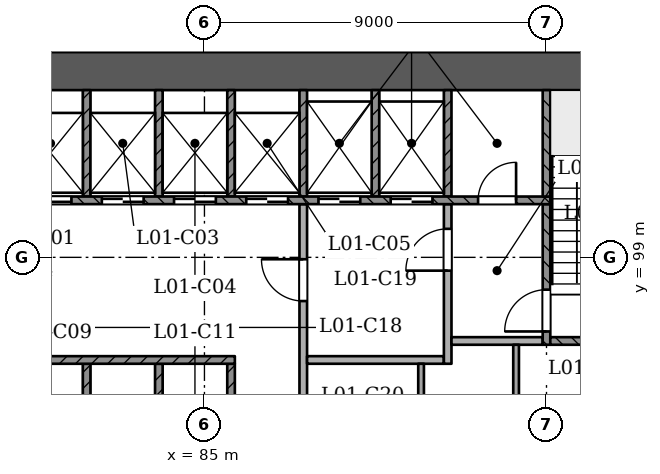
"""IFC4 building model, lengths in metres.
Left out: names, types, materials, properties, quantities, classifications, styles, units other than length and angle.
Written with IfcOpenShell. Run it as: python <this file> out.ifc"""

import sys

from ifc_helpers import new_model, si_unit, direction, frame, frame_2d, origin, place, context, subcontext, project, spatial, rectangle, extrude, element, fill, save


model = new_model("IFC4")
c1 = context("Model", 3, precision=1e-05, world=origin(), true_north=direction((0.0, 1.0)))
c2 = subcontext(c1, "Body", "Model", "MODEL_VIEW")
j1 = project(units=[si_unit("LENGTHUNIT", "METRE"), si_unit("PLANEANGLEUNIT", "RADIAN")], contexts=[c1])
p1 = place(None, origin())
s1 = spatial("IfcSite", under=j1, at=p1, CompositionType="ELEMENT")
p2 = place(p1, origin())
s2 = spatial("IfcBuilding", under=s1, at=p2, CompositionType="ELEMENT")
p3 = place(p2, frame((0.0, 0.0, 9.0)))
s3 = spatial("IfcBuildingStorey", under=s2, at=p3, CompositionType="ELEMENT", Elevation=9.0)
p4 = place(p3, frame((97.5, 103.9, 0.0), z_axis=(0.0, 0.0, 1.0), x_axis=(-1.0, 0.0, 0.0)))
e1 = element("IfcWall", 1, at=p4, inside=s3, PredefinedType="SHEAR", context=c2, shape_type="SweptSolid", body=[
    extrude(rectangle(XDim=25.5, YDim=1.0, at=frame_2d((12.75, 0.0))), origin(), (0.0, 0.0, 1.0), 4.5),
])
p5 = place(p3, frame((55.57, 95.474, 0.0), z_axis=(0.0, 0.0, 1.0), x_axis=(0.500000085768, -0.866025354266, 0.0)))
e2 = element("IfcWall", 2, at=p5, inside=s3, PredefinedType="PARTITIONING", context=c2, shape_type="SweptSolid", body=[
    extrude(rectangle(XDim=55.365, YDim=0.15, at=frame_2d((27.682, 0.0))), origin(), (0.0, 0.0, 1.0), 4.05),
])
p6 = place(p5, frame((6.832, 0.0, 0.0)))
e3 = element("IfcOpeningElement", 3, at=p6, cuts=e2, PredefinedType="OPENING", context=c2, shape_type="SweptSolid", body=[
    extrude(rectangle(XDim=1.2, YDim=2.1, at=frame_2d((0.6, 1.05))), frame((0.0, 0.085, 0.0), z_axis=(0.0, -1.0, 0.0), x_axis=(1.0, 0.0, 0.0)), (0.0, 0.0, 1.0), 0.171),
])
p7 = place(p5, frame((18.182, 0.0, 0.0)))
e4 = element("IfcOpeningElement", 4, at=p7, cuts=e2, PredefinedType="OPENING", context=c2, shape_type="SweptSolid", body=[
    extrude(rectangle(XDim=1.0, YDim=2.1, at=frame_2d((0.5, 1.05))), frame((0.0, 0.085, 0.0), z_axis=(0.0, -1.0, 0.0), x_axis=(1.0, 0.0, 0.0)), (0.0, 0.0, 1.0), 0.171),
])
p8 = place(p5, frame((30.132, 0.0, 0.0)))
e5 = element("IfcOpeningElement", 5, at=p8, cuts=e2, PredefinedType="OPENING", context=c2, shape_type="SweptSolid", body=[
    extrude(rectangle(XDim=1.2, YDim=2.1, at=frame_2d((0.6, 1.05))), frame((0.0, 0.085, 0.0), z_axis=(0.0, -1.0, 0.0), x_axis=(1.0, 0.0, 0.0)), (0.0, 0.0, 1.0), 0.171),
])
p9 = place(p5, frame((40.582, 0.0, 0.0)))
e6 = element("IfcOpeningElement", 6, at=p9, cuts=e2, PredefinedType="OPENING", context=c2, shape_type="SweptSolid", body=[
    extrude(rectangle(XDim=1.2, YDim=2.1, at=frame_2d((0.6, 1.05))), frame((0.0, 0.085, 0.0), z_axis=(0.0, -1.0, 0.0), x_axis=(1.0, 0.0, 0.0)), (0.0, 0.0, 1.0), 0.171),
])
p10 = place(p5, frame((46.315, 0.0, 0.0)))
e7 = element("IfcOpeningElement", 7, at=p10, cuts=e2, PredefinedType="OPENING", context=c2, shape_type="SweptSolid", body=[
    extrude(rectangle(XDim=0.9, YDim=2.1, at=frame_2d((0.45, 1.05))), frame((0.0, 0.085, 0.0), z_axis=(0.0, -1.0, 0.0), x_axis=(1.0, 0.0, 0.0)), (0.0, 0.0, 1.0), 0.171),
])
p11 = place(p5, frame((48.565, 0.0, 0.0)))
e8 = element("IfcOpeningElement", 8, at=p11, cuts=e2, PredefinedType="OPENING", context=c2, shape_type="SweptSolid", body=[
    extrude(rectangle(XDim=0.9, YDim=2.1, at=frame_2d((0.45, 1.05))), frame((0.0, 0.085, 0.0), z_axis=(0.0, -1.0, 0.0), x_axis=(1.0, 0.0, 0.0)), (0.0, 0.0, 1.0), 0.171),
])
p12 = place(p5, frame((53.195, 0.0, 0.0)))
e9 = element("IfcOpeningElement", 9, at=p12, cuts=e2, PredefinedType="OPENING", context=c2, shape_type="SweptSolid", body=[
    extrude(rectangle(XDim=1.2, YDim=2.1, at=frame_2d((0.6, 1.05))), frame((0.0, 0.085, 0.0), z_axis=(0.0, -1.0, 0.0), x_axis=(1.0, 0.0, 0.0)), (0.0, 0.0, 1.0), 0.171),
])
p13 = place(p3, frame((86.747, 47.526, 0.0), z_axis=(0.0, 0.0, 1.0), x_axis=(0.500000085768, 0.866025354266, 0.0)))
e10 = element("IfcWall", 10, at=p13, inside=s3, PredefinedType="PARTITIONING", context=c2, shape_type="SweptSolid", body=[
    extrude(rectangle(XDim=55.365, YDim=0.15, at=frame_2d((27.682, 0.0))), origin(), (0.0, 0.0, 1.0), 4.05),
])
p14 = place(p13, frame((0.97, 0.0, 0.0)))
e11 = element("IfcOpeningElement", 11, at=p14, cuts=e10, PredefinedType="OPENING", context=c2, shape_type="SweptSolid", body=[
    extrude(rectangle(XDim=1.2, YDim=2.1, at=frame_2d((0.6, 1.05))), frame((0.0, 0.085, 0.0), z_axis=(0.0, -1.0, 0.0), x_axis=(1.0, 0.0, 0.0)), (0.0, 0.0, 1.0), 0.171),
])
p15 = place(p13, frame((9.082, 0.0, 0.0)))
e12 = element("IfcOpeningElement", 12, at=p15, cuts=e10, PredefinedType="OPENING", context=c2, shape_type="SweptSolid", body=[
    extrude(rectangle(XDim=1.2, YDim=2.1, at=frame_2d((0.6, 1.05))), frame((0.0, 0.085, 0.0), z_axis=(0.0, -1.0, 0.0), x_axis=(1.0, 0.0, 0.0)), (0.0, 0.0, 1.0), 0.171),
])
p16 = place(p13, frame((18.082, 0.0, 0.0)))
e13 = element("IfcOpeningElement", 13, at=p16, cuts=e10, PredefinedType="OPENING", context=c2, shape_type="SweptSolid", body=[
    extrude(rectangle(XDim=1.2, YDim=2.1, at=frame_2d((0.6, 1.05))), frame((0.0, 0.085, 0.0), z_axis=(0.0, -1.0, 0.0), x_axis=(1.0, 0.0, 0.0)), (0.0, 0.0, 1.0), 0.171),
])
p17 = place(p13, frame((23.613, 0.0, 0.0)))
e14 = element("IfcOpeningElement", 14, at=p17, cuts=e10, PredefinedType="OPENING", context=c2, shape_type="SweptSolid", body=[
    extrude(rectangle(XDim=1.0, YDim=2.1, at=frame_2d((0.5, 1.05))), frame((0.0, 0.085, 0.0), z_axis=(0.0, -1.0, 0.0), x_axis=(1.0, 0.0, 0.0)), (0.0, 0.0, 1.0), 0.171),
])
p18 = place(p13, frame((26.363, 0.0, 0.0)))
e15 = element("IfcOpeningElement", 15, at=p18, cuts=e10, PredefinedType="OPENING", context=c2, shape_type="SweptSolid", body=[
    extrude(rectangle(XDim=1.0, YDim=2.1, at=frame_2d((0.5, 1.05))), frame((0.0, 0.085, 0.0), z_axis=(0.0, -1.0, 0.0), x_axis=(1.0, 0.0, 0.0)), (0.0, 0.0, 1.0), 0.171),
])
p19 = place(p13, frame((33.032, 0.0, 0.0)))
e16 = element("IfcOpeningElement", 16, at=p19, cuts=e10, PredefinedType="OPENING", context=c2, shape_type="SweptSolid", body=[
    extrude(rectangle(XDim=1.2, YDim=2.1, at=frame_2d((0.6, 1.05))), frame((0.0, 0.085, 0.0), z_axis=(0.0, -1.0, 0.0), x_axis=(1.0, 0.0, 0.0)), (0.0, 0.0, 1.0), 0.171),
])
p20 = place(p13, frame((47.337, 0.0, 0.0)))
e17 = element("IfcOpeningElement", 17, at=p20, cuts=e10, PredefinedType="OPENING", context=c2, shape_type="SweptSolid", body=[
    extrude(rectangle(XDim=1.2, YDim=2.1, at=frame_2d((0.6, 1.05))), frame((0.0, 0.085, 0.0), z_axis=(0.0, -1.0, 0.0), x_axis=(1.0, 0.0, 0.0)), (0.0, 0.0, 1.0), 0.171),
])
p21 = place(p3, frame((121.762, 95.574, 0.0), z_axis=(0.0, 0.0, 1.0), x_axis=(-0.499997306052, -0.866026959131, 0.0)))
e18 = element("IfcWall", 18, at=p21, inside=s3, PredefinedType="SOLIDWALL", context=c2, shape_type="SweptSolid", body=[
    extrude(rectangle(XDim=62.87, YDim=0.4, at=frame_2d((31.435, 0.0))), origin(), (0.0, 0.0, 1.0), 4.05),
])
p22 = place(p21, frame((59.452, 0.0, 0.9)))
e19 = element("IfcOpeningElement", 19, at=p22, cuts=e18, PredefinedType="OPENING", context=c2, shape_type="SweptSolid", body=[
    extrude(rectangle(XDim=2.4, YDim=1.5, at=frame_2d((1.2, 0.75))), frame((0.0, 0.21, 0.0), z_axis=(0.0, -1.0, 0.0), x_axis=(1.0, 0.0, 0.0)), (0.0, 0.0, 1.0), 0.421),
])
p23 = place(p21, frame((54.986, 0.0, 0.9)))
e20 = element("IfcOpeningElement", 20, at=p23, cuts=e18, PredefinedType="OPENING", context=c2, shape_type="SweptSolid", body=[
    extrude(rectangle(XDim=2.4, YDim=1.5, at=frame_2d((1.2, 0.75))), frame((0.0, 0.21, 0.0), z_axis=(0.0, -1.0, 0.0), x_axis=(1.0, 0.0, 0.0)), (0.0, 0.0, 1.0), 0.421),
])
p24 = place(p21, frame((50.486, 0.0, 0.9)))
e21 = element("IfcOpeningElement", 21, at=p24, cuts=e18, PredefinedType="OPENING", context=c2, shape_type="SweptSolid", body=[
    extrude(rectangle(XDim=2.4, YDim=1.5, at=frame_2d((1.2, 0.75))), frame((0.0, 0.21, 0.0), z_axis=(0.0, -1.0, 0.0), x_axis=(1.0, 0.0, 0.0)), (0.0, 0.0, 1.0), 0.421),
])
p25 = place(p21, frame((45.986, 0.0, 0.9)))
e22 = element("IfcOpeningElement", 22, at=p25, cuts=e18, PredefinedType="OPENING", context=c2, shape_type="SweptSolid", body=[
    extrude(rectangle(XDim=2.4, YDim=1.5, at=frame_2d((1.2, 0.75))), frame((0.0, 0.21, 0.0), z_axis=(0.0, -1.0, 0.0), x_axis=(1.0, 0.0, 0.0)), (0.0, 0.0, 1.0), 0.421),
])
p26 = place(p21, frame((41.486, 0.0, 0.9)))
e23 = element("IfcOpeningElement", 23, at=p26, cuts=e18, PredefinedType="OPENING", context=c2, shape_type="SweptSolid", body=[
    extrude(rectangle(XDim=2.4, YDim=1.5, at=frame_2d((1.2, 0.75))), frame((0.0, 0.21, 0.0), z_axis=(0.0, -1.0, 0.0), x_axis=(1.0, 0.0, 0.0)), (0.0, 0.0, 1.0), 0.421),
])
p27 = place(p21, frame((36.986, 0.0, 0.9)))
e24 = element("IfcOpeningElement", 24, at=p27, cuts=e18, PredefinedType="OPENING", context=c2, shape_type="SweptSolid", body=[
    extrude(rectangle(XDim=2.4, YDim=1.5, at=frame_2d((1.2, 0.75))), frame((0.0, 0.21, 0.0), z_axis=(0.0, -1.0, 0.0), x_axis=(1.0, 0.0, 0.0)), (0.0, 0.0, 1.0), 0.421),
])
p28 = place(p21, frame((23.486, 0.0, 0.9)))
e25 = element("IfcOpeningElement", 25, at=p28, cuts=e18, PredefinedType="OPENING", context=c2, shape_type="SweptSolid", body=[
    extrude(rectangle(XDim=2.4, YDim=1.5, at=frame_2d((1.2, 0.75))), frame((0.0, 0.21, 0.0), z_axis=(0.0, -1.0, 0.0), x_axis=(1.0, 0.0, 0.0)), (0.0, 0.0, 1.0), 0.421),
])
p29 = place(p21, frame((18.986, 0.0, 0.9)))
e26 = element("IfcOpeningElement", 26, at=p29, cuts=e18, PredefinedType="OPENING", context=c2, shape_type="SweptSolid", body=[
    extrude(rectangle(XDim=2.4, YDim=1.5, at=frame_2d((1.2, 0.75))), frame((0.0, 0.21, 0.0), z_axis=(0.0, -1.0, 0.0), x_axis=(1.0, 0.0, 0.0)), (0.0, 0.0, 1.0), 0.421),
])
p30 = place(p21, frame((14.486, 0.0, 0.9)))
e27 = element("IfcOpeningElement", 27, at=p30, cuts=e18, PredefinedType="OPENING", context=c2, shape_type="SweptSolid", body=[
    extrude(rectangle(XDim=2.4, YDim=1.5, at=frame_2d((1.2, 0.75))), frame((0.0, 0.21, 0.0), z_axis=(0.0, -1.0, 0.0), x_axis=(1.0, 0.0, 0.0)), (0.0, 0.0, 1.0), 0.421),
])
p31 = place(p21, frame((5.486, 0.0, 0.9)))
e28 = element("IfcOpeningElement", 28, at=p31, cuts=e18, PredefinedType="OPENING", context=c2, shape_type="SweptSolid", body=[
    extrude(rectangle(XDim=2.4, YDim=1.5, at=frame_2d((1.2, 0.75))), frame((0.0, 0.21, 0.0), z_axis=(0.0, -1.0, 0.0), x_axis=(1.0, 0.0, 0.0)), (0.0, 0.0, 1.0), 0.421),
])
p32 = place(p21, frame((1.018, 0.0, 0.9)))
e29 = element("IfcOpeningElement", 29, at=p32, cuts=e18, PredefinedType="OPENING", context=c2, shape_type="SweptSolid", body=[
    extrude(rectangle(XDim=2.4, YDim=1.5, at=frame_2d((1.2, 0.75))), frame((0.0, 0.21, 0.0), z_axis=(0.0, -1.0, 0.0), x_axis=(1.0, 0.0, 0.0)), (0.0, 0.0, 1.0), 0.421),
])
for number, where, z_axis, x_axis in (
    (30, (81.9, 93.4, 0.0), (0.0, 0.0, 1.0), (0.0, 1.0, 0.0)),
    (31, (83.8, 93.4, 0.0), (0.0, 0.0, 1.0), (0.0, 1.0, 0.0)),
    (32, (85.7, 93.4, 0.0), (0.0, 0.0, 1.0), (0.0, 1.0, 0.0)),
):
    element("IfcWall", number, at=place(p3, frame(where, z_axis=z_axis, x_axis=x_axis)), inside=s3, PredefinedType="SOLIDWALL", context=c2, shape_type="SweptSolid", body=[
        extrude(rectangle(XDim=2.8, YDim=0.2, at=frame_2d((1.4, 0.0))), origin(), (0.0, 0.0, 1.0), 4.05),
    ])
p33 = place(p3, frame((87.6, 93.4, 0.0), z_axis=(0.0, 0.0, 1.0), x_axis=(0.0, 1.0, 0.0)))
e33 = element("IfcWall", 33, at=p33, inside=s3, PredefinedType="PARTITIONING", context=c2, shape_type="SweptSolid", body=[
    extrude(rectangle(XDim=7.0, YDim=0.2, at=frame_2d((3.5, 0.0))), origin(), (0.0, 0.0, 1.0), 4.05),
])
p34 = place(p33, frame((4.45, 0.0, 0.0)))
e34 = element("IfcOpeningElement", 34, at=p34, cuts=e33, PredefinedType="OPENING", context=c2, shape_type="SweptSolid", body=[
    extrude(rectangle(XDim=1.1, YDim=2.1, at=frame_2d((0.55, 1.05))), frame((0.0, 0.11, 0.0), z_axis=(0.0, -1.0, 0.0), x_axis=(1.0, 0.0, 0.0)), (0.0, 0.0, 1.0), 0.221),
])
p35 = place(p3, frame((90.7, 93.4, 0.0), z_axis=(0.0, 0.0, 1.0), x_axis=(0.0, 1.0, 0.0)))
e35 = element("IfcWall", 35, at=p35, inside=s3, PredefinedType="PARTITIONING", context=c2, shape_type="SweptSolid", body=[
    extrude(rectangle(XDim=2.8, YDim=0.15, at=frame_2d((1.4, 0.0))), origin(), (0.0, 0.0, 1.0), 4.05),
])
p36 = place(p3, frame((93.2, 93.4, 0.0), z_axis=(0.0, 0.0, 1.0), x_axis=(0.0, 1.0, 0.0)))
e36 = element("IfcWall", 36, at=p36, inside=s3, PredefinedType="PARTITIONING", context=c2, shape_type="SweptSolid", body=[
    extrude(rectangle(XDim=3.3, YDim=0.15, at=frame_2d((1.65, 0.0))), origin(), (0.0, 0.0, 1.0), 4.05),
])
p37 = place(p3, frame((78.0, 96.3, 0.0), z_axis=(0.0, 0.0, 1.0), x_axis=(1.0, 0.0, 0.0)))
e37 = element("IfcWall", 37, at=p37, inside=s3, PredefinedType="SOLIDWALL", context=c2, shape_type="SweptSolid", body=[
    extrude(rectangle(XDim=7.8, YDim=0.2, at=frame_2d((3.9, 0.0))), origin(), (0.0, 0.0, 1.0), 4.05),
])
p38 = place(p3, frame((87.7, 96.3, 0.0), z_axis=(0.0, 0.0, 1.0), x_axis=(1.0, 0.0, 0.0)))
e38 = element("IfcWall", 38, at=p38, inside=s3, PredefinedType="PARTITIONING", context=c2, shape_type="SweptSolid", body=[
    extrude(rectangle(XDim=3.6, YDim=0.2, at=frame_2d((1.8, 0.0))), origin(), (0.0, 0.0, 1.0), 4.05),
])
p39 = place(p3, frame((91.4, 96.2, 0.0), z_axis=(0.0, 0.0, 1.0), x_axis=(0.0, 1.0, 0.0)))
e39 = element("IfcWall", 39, at=p39, inside=s3, PredefinedType="PARTITIONING", context=c2, shape_type="SweptSolid", body=[
    extrude(rectangle(XDim=4.2, YDim=0.2, at=frame_2d((2.1, 0.0))), origin(), (0.0, 0.0, 1.0), 4.05),
])
p40 = place(p39, frame((2.45, 0.0, 0.0)))
e40 = element("IfcOpeningElement", 40, at=p40, cuts=e39, PredefinedType="OPENING", context=c2, shape_type="SweptSolid", body=[
    extrude(rectangle(XDim=1.1, YDim=2.1, at=frame_2d((0.55, 1.05))), frame((0.0, 0.11, 0.0), z_axis=(0.0, -1.0, 0.0), x_axis=(1.0, 0.0, 0.0)), (0.0, 0.0, 1.0), 0.221),
])
p41 = place(p3, frame((91.5, 96.8, 0.0), z_axis=(0.0, 0.0, 1.0), x_axis=(1.0, 0.0, 0.0)))
e41 = element("IfcWall", 41, at=p41, inside=s3, PredefinedType="PARTITIONING", context=c2, shape_type="SweptSolid", body=[
    extrude(rectangle(XDim=2.4, YDim=0.2, at=frame_2d((1.2, 0.0))), origin(), (0.0, 0.0, 1.0), 4.05),
])
p42 = place(p3, frame((94.0, 96.7, 0.0), z_axis=(0.0, 0.0, 1.0), x_axis=(0.0, 1.0, 0.0)))
e42 = element("IfcWall", 42, at=p42, inside=s3, PredefinedType="SOLIDWALL", context=c2, shape_type="SweptSolid", body=[
    extrude(rectangle(XDim=3.7, YDim=0.2, at=frame_2d((1.85, 0.0))), origin(), (0.0, 0.0, 1.0), 4.05),
])
p43 = place(p42, frame((0.35, 0.0, 0.0)))
e43 = element("IfcOpeningElement", 43, at=p43, cuts=e42, PredefinedType="OPENING", context=c2, shape_type="SweptSolid", body=[
    extrude(rectangle(XDim=1.1, YDim=2.1, at=frame_2d((0.55, 1.05))), frame((0.0, 0.11, 0.0), z_axis=(0.0, -1.0, 0.0), x_axis=(1.0, 0.0, 0.0)), (0.0, 0.0, 1.0), 0.221),
])
p44 = place(p3, frame((94.1, 96.8, 0.0), z_axis=(0.0, 0.0, 1.0), x_axis=(1.0, 0.0, 0.0)))
e44 = element("IfcWall", 44, at=p44, inside=s3, PredefinedType="SOLIDWALL", context=c2, shape_type="SweptSolid", body=[
    extrude(rectangle(XDim=2.9, YDim=0.2, at=frame_2d((1.45, 0.0))), origin(), (0.0, 0.0, 1.0), 4.05),
])
p45 = place(p3, frame((75.9, 100.5, 0.0), z_axis=(0.0, 0.0, 1.0), x_axis=(1.0, 0.0, 0.0)))
e45 = element("IfcWall", 45, at=p45, inside=s3, PredefinedType="SOLIDWALL", context=c2, shape_type="SweptSolid", body=[
    extrude(rectangle(XDim=18.2, YDim=0.2, at=frame_2d((9.1, 0.0))), origin(), (0.0, 0.0, 1.0), 4.05),
])
p46 = place(p45, frame((2.6, 0.0, 0.0)))
e46 = element("IfcOpeningElement", 46, at=p46, cuts=e45, PredefinedType="OPENING", context=c2, shape_type="SweptSolid", body=[
    extrude(rectangle(XDim=1.1, YDim=2.1, at=frame_2d((0.55, 1.05))), frame((0.0, 0.11, 0.0), z_axis=(0.0, -1.0, 0.0), x_axis=(1.0, 0.0, 0.0)), (0.0, 0.0, 1.0), 0.221),
])
p47 = place(p45, frame((4.5, 0.0, 0.0)))
e47 = element("IfcOpeningElement", 47, at=p47, cuts=e45, PredefinedType="OPENING", context=c2, shape_type="SweptSolid", body=[
    extrude(rectangle(XDim=1.1, YDim=2.1, at=frame_2d((0.55, 1.05))), frame((0.0, 0.11, 0.0), z_axis=(0.0, -1.0, 0.0), x_axis=(1.0, 0.0, 0.0)), (0.0, 0.0, 1.0), 0.221),
])
p48 = place(p45, frame((6.4, 0.0, 0.0)))
e48 = element("IfcOpeningElement", 48, at=p48, cuts=e45, PredefinedType="OPENING", context=c2, shape_type="SweptSolid", body=[
    extrude(rectangle(XDim=1.1, YDim=2.1, at=frame_2d((0.55, 1.05))), frame((0.0, 0.11, 0.0), z_axis=(0.0, -1.0, 0.0), x_axis=(1.0, 0.0, 0.0)), (0.0, 0.0, 1.0), 0.221),
])
p49 = place(p45, frame((8.3, 0.0, 0.0)))
e49 = element("IfcOpeningElement", 49, at=p49, cuts=e45, PredefinedType="OPENING", context=c2, shape_type="SweptSolid", body=[
    extrude(rectangle(XDim=1.1, YDim=2.1, at=frame_2d((0.55, 1.05))), frame((0.0, 0.11, 0.0), z_axis=(0.0, -1.0, 0.0), x_axis=(1.0, 0.0, 0.0)), (0.0, 0.0, 1.0), 0.221),
])
p50 = place(p45, frame((10.2, 0.0, 0.0)))
e50 = element("IfcOpeningElement", 50, at=p50, cuts=e45, PredefinedType="OPENING", context=c2, shape_type="SweptSolid", body=[
    extrude(rectangle(XDim=1.1, YDim=2.1, at=frame_2d((0.55, 1.05))), frame((0.0, 0.11, 0.0), z_axis=(0.0, -1.0, 0.0), x_axis=(1.0, 0.0, 0.0)), (0.0, 0.0, 1.0), 0.221),
])
p51 = place(p45, frame((12.1, 0.0, 0.0)))
e51 = element("IfcOpeningElement", 51, at=p51, cuts=e45, PredefinedType="OPENING", context=c2, shape_type="SweptSolid", body=[
    extrude(rectangle(XDim=1.1, YDim=2.1, at=frame_2d((0.55, 1.05))), frame((0.0, 0.11, 0.0), z_axis=(0.0, -1.0, 0.0), x_axis=(1.0, 0.0, 0.0)), (0.0, 0.0, 1.0), 0.221),
])
p52 = place(p45, frame((14.0, 0.0, 0.0)))
e52 = element("IfcOpeningElement", 52, at=p52, cuts=e45, PredefinedType="OPENING", context=c2, shape_type="SweptSolid", body=[
    extrude(rectangle(XDim=1.1, YDim=2.1, at=frame_2d((0.55, 1.05))), frame((0.0, 0.11, 0.0), z_axis=(0.0, -1.0, 0.0), x_axis=(1.0, 0.0, 0.0)), (0.0, 0.0, 1.0), 0.221),
])
p53 = place(p45, frame((0.65, 0.0, 0.0)))
e53 = element("IfcOpeningElement", 53, at=p53, cuts=e45, PredefinedType="OPENING", context=c2, shape_type="SweptSolid", body=[
    extrude(rectangle(XDim=1.0, YDim=2.1, at=frame_2d((0.5, 1.05))), frame((0.0, 0.11, 0.0), z_axis=(0.0, -1.0, 0.0), x_axis=(1.0, 0.0, 0.0)), (0.0, 0.0, 1.0), 0.221),
])
p54 = place(p45, frame((16.3, 0.0, 0.0)))
e54 = element("IfcOpeningElement", 54, at=p54, cuts=e45, PredefinedType="OPENING", context=c2, shape_type="SweptSolid", body=[
    extrude(rectangle(XDim=1.0, YDim=2.1, at=frame_2d((0.5, 1.05))), frame((0.0, 0.11, 0.0), z_axis=(0.0, -1.0, 0.0), x_axis=(1.0, 0.0, 0.0)), (0.0, 0.0, 1.0), 0.221),
])
for number, where, z_axis, x_axis in (
    (55, (81.9, 100.6, 0.0), (0.0, 0.0, 1.0), (0.0, 1.0, 0.0)),
    (56, (83.8, 100.6, 0.0), (0.0, 0.0, 1.0), (0.0, 1.0, 0.0)),
    (57, (85.7, 100.6, 0.0), (0.0, 0.0, 1.0), (0.0, 1.0, 0.0)),
    (58, (87.6, 100.6, 0.0), (0.0, 0.0, 1.0), (0.0, 1.0, 0.0)),
    (59, (89.5, 100.6, 0.0), (0.0, 0.0, 1.0), (0.0, 1.0, 0.0)),
    (60, (91.4, 100.6, 0.0), (0.0, 0.0, 1.0), (0.0, 1.0, 0.0)),
    (61, (94.0, 100.6, 0.0), (0.0, 0.0, 1.0), (0.0, 1.0, 0.0)),
):
    element("IfcWall", number, at=place(p3, frame(where, z_axis=z_axis, x_axis=x_axis)), inside=s3, PredefinedType="SOLIDWALL", context=c2, shape_type="SweptSolid", body=[
        extrude(rectangle(XDim=2.8, YDim=0.2, at=frame_2d((1.4, 0.0))), origin(), (0.0, 0.0, 1.0), 4.05),
    ])
p55 = place(p47, origin())
e62 = element("IfcDoor", 62, at=p55, inside=s3, OperationType="SLIDING_TO_LEFT", PredefinedType="NOTDEFINED", context=c2, shape_type="SweptSolid", body=[
    extrude(rectangle(XDim=1.1, YDim=2.1, at=frame_2d((0.55, 1.05))), frame((0.0, 0.025, 0.0), z_axis=(0.0, -1.0, 0.0), x_axis=(1.0, 0.0, 0.0)), (0.0, 0.0, 1.0), 0.05),
])
fill(e47, e62)
p56 = place(p48, origin())
e63 = element("IfcDoor", 63, at=p56, inside=s3, OperationType="SLIDING_TO_RIGHT", PredefinedType="NOTDEFINED", context=c2, shape_type="SweptSolid", body=[
    extrude(rectangle(XDim=1.1, YDim=2.1, at=frame_2d((0.55, 1.05))), frame((0.0, 0.025, 0.0), z_axis=(0.0, -1.0, 0.0), x_axis=(1.0, 0.0, 0.0)), (0.0, 0.0, 1.0), 0.05),
])
fill(e48, e63)
p57 = place(p49, origin())
e64 = element("IfcDoor", 64, at=p57, inside=s3, OperationType="SLIDING_TO_LEFT", PredefinedType="NOTDEFINED", context=c2, shape_type="SweptSolid", body=[
    extrude(rectangle(XDim=1.1, YDim=2.1, at=frame_2d((0.55, 1.05))), frame((0.0, 0.025, 0.0), z_axis=(0.0, -1.0, 0.0), x_axis=(1.0, 0.0, 0.0)), (0.0, 0.0, 1.0), 0.05),
])
fill(e49, e64)
p58 = place(p50, origin())
e65 = element("IfcDoor", 65, at=p58, inside=s3, OperationType="SLIDING_TO_RIGHT", PredefinedType="NOTDEFINED", context=c2, shape_type="SweptSolid", body=[
    extrude(rectangle(XDim=1.1, YDim=2.1, at=frame_2d((0.55, 1.05))), frame((0.0, 0.025, 0.0), z_axis=(0.0, -1.0, 0.0), x_axis=(1.0, 0.0, 0.0)), (0.0, 0.0, 1.0), 0.05),
])
fill(e50, e65)
p59 = place(p51, origin())
e66 = element("IfcDoor", 66, at=p59, inside=s3, OperationType="SLIDING_TO_RIGHT", PredefinedType="NOTDEFINED", context=c2, shape_type="SweptSolid", body=[
    extrude(rectangle(XDim=1.1, YDim=2.1, at=frame_2d((0.55, 1.05))), frame((0.0, 0.025, 0.0), z_axis=(0.0, -1.0, 0.0), x_axis=(1.0, 0.0, 0.0)), (0.0, 0.0, 1.0), 0.05),
])
fill(e51, e66)
p60 = place(p52, origin())
e67 = element("IfcDoor", 67, at=p60, inside=s3, OperationType="SLIDING_TO_LEFT", PredefinedType="NOTDEFINED", context=c2, shape_type="SweptSolid", body=[
    extrude(rectangle(XDim=1.1, YDim=2.1, at=frame_2d((0.55, 1.05))), frame((0.0, 0.025, 0.0), z_axis=(0.0, -1.0, 0.0), x_axis=(1.0, 0.0, 0.0)), (0.0, 0.0, 1.0), 0.05),
])
fill(e52, e67)
p61 = place(p43, origin())
e68 = element("IfcDoor", 68, at=p61, inside=s3, OperationType="SINGLE_SWING_LEFT", PredefinedType="NOTDEFINED", context=c2, shape_type="SweptSolid", body=[
    extrude(rectangle(XDim=1.1, YDim=2.1, at=frame_2d((0.55, 1.05))), frame((0.0, 0.025, 0.0), z_axis=(0.0, -1.0, 0.0), x_axis=(1.0, 0.0, 0.0)), (0.0, 0.0, 1.0), 0.05),
])
fill(e43, e68)
p62 = place(p34, origin())
e69 = element("IfcDoor", 69, at=p62, inside=s3, OperationType="SINGLE_SWING_RIGHT", PredefinedType="NOTDEFINED", context=c2, shape_type="SweptSolid", body=[
    extrude(rectangle(XDim=1.1, YDim=2.1, at=frame_2d((0.55, 1.05))), frame((0.0, 0.025, 0.0), z_axis=(0.0, -1.0, 0.0), x_axis=(1.0, 0.0, 0.0)), (0.0, 0.0, 1.0), 0.05),
])
fill(e34, e69)
p63 = place(p40, origin())
e70 = element("IfcDoor", 70, at=p63, inside=s3, OperationType="SINGLE_SWING_LEFT", PredefinedType="NOTDEFINED", context=c2, shape_type="SweptSolid", body=[
    extrude(rectangle(XDim=1.1, YDim=2.1, at=frame_2d((0.55, 1.05))), frame((0.0, 0.025, 0.0), z_axis=(0.0, -1.0, 0.0), x_axis=(1.0, 0.0, 0.0)), (0.0, 0.0, 1.0), 0.05),
])
fill(e40, e70)
p64 = place(p54, origin())
e71 = element("IfcDoor", 71, at=p64, inside=s3, OperationType="SINGLE_SWING_RIGHT", PredefinedType="NOTDEFINED", context=c2, shape_type="SweptSolid", body=[
    extrude(rectangle(XDim=1.0, YDim=2.1, at=frame_2d((0.5, 1.05))), frame((0.0, 0.025, 0.0), z_axis=(0.0, -1.0, 0.0), x_axis=(1.0, 0.0, 0.0)), (0.0, 0.0, 1.0), 0.05),
])
fill(e54, e71)
save(model, sys.argv[1])
